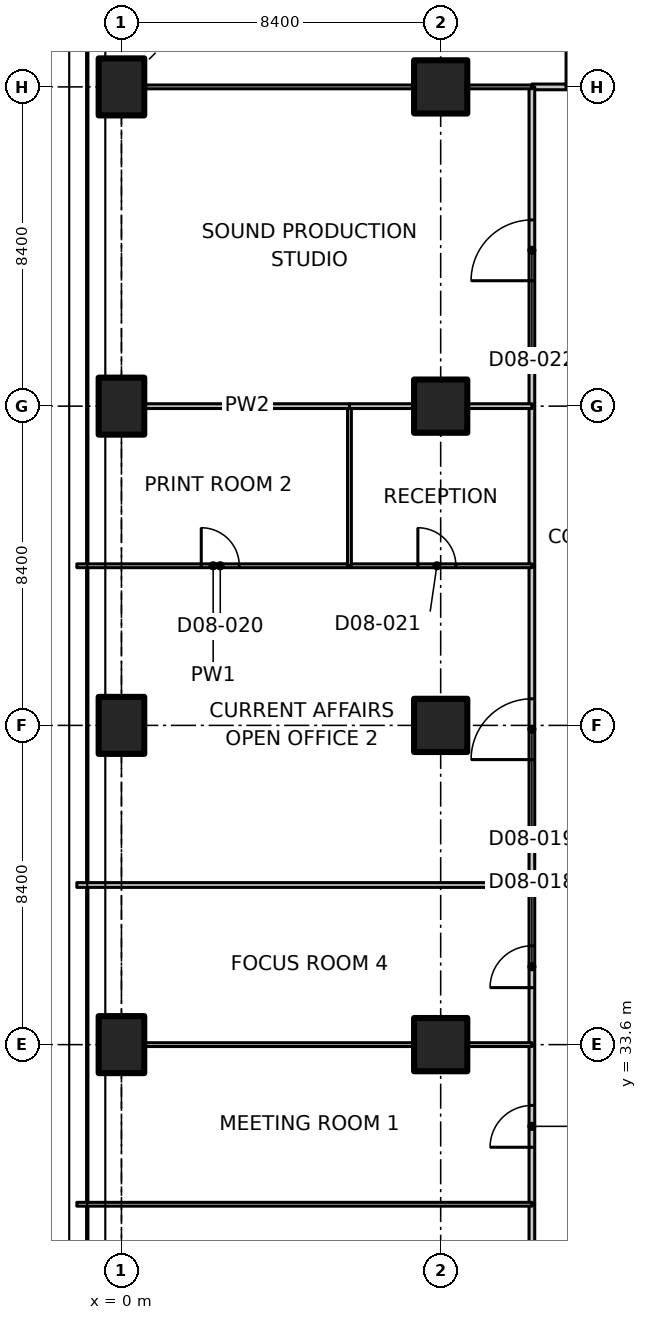
"""IFC4 building model, lengths in metres.
Left out: names, types, materials, properties, quantities, classifications, styles, units other than length and angle.
Written with IfcOpenShell. Run it as: python <this file> out.ifc"""

import sys

from ifc_helpers import new_model, si_unit, direction, frame, frame_2d, origin, origin_2d, place, context, subcontext, project, spatial, polyline, rectangle, outline, extrude, element, fill, save


model = new_model("IFC4")
c1 = context("Model", 3, precision=1e-05, world=origin(), true_north=direction((0.0, 1.0)))
c2 = subcontext(c1, "Body", "Model", "MODEL_VIEW")
j1 = project(units=[si_unit("LENGTHUNIT", "METRE"), si_unit("PLANEANGLEUNIT", "RADIAN")], contexts=[c1])
p1 = place(None, origin())
s1 = spatial("IfcSite", under=j1, at=p1, CompositionType="ELEMENT")
p2 = place(p1, origin())
s2 = spatial("IfcBuilding", under=s1, at=p2, CompositionType="ELEMENT")
p3 = place(p2, frame((0.0, 0.0, 50.9)))
s3 = spatial("IfcBuildingStorey", under=s2, at=p3, CompositionType="ELEMENT", Elevation=50.9)
for number, where, z_axis, x_axis in (
    (1, (0.0, 33.6, 0.0), (0.0, 0.0, 1.0), (1.0, 0.0, 0.0)),
    (2, (0.0, 42.0, 0.0), (0.0, 0.0, 1.0), (1.0, 0.0, 0.0)),
    (3, (0.0, 50.4, 0.0), (0.0, 0.0, 1.0), (1.0, 0.0, 0.0)),
    (4, (0.0, 58.8, 0.0), (0.0, 0.0, 1.0), (1.0, 0.0, 0.0)),
):
    element("IfcColumn", number, at=place(p3, frame(where, z_axis=z_axis, x_axis=x_axis)), inside=s3, PredefinedType="COLUMN", context=c2, shape_type="SweptSolid", body=[
        extrude(rectangle(XDim=1.2, YDim=1.5, at=origin_2d()), origin(), (0.0, 0.0, 1.0), 3.35),
    ])
for number, where, z_axis, x_axis in (
    (5, (8.4, 33.6, 0.0), (0.0, 0.0, 1.0), (1.0, 0.0, 0.0)),
    (6, (8.4, 42.0, 0.0), (0.0, 0.0, 1.0), (1.0, 0.0, 0.0)),
    (7, (8.4, 50.4, 0.0), (0.0, 0.0, 1.0), (1.0, 0.0, 0.0)),
    (8, (8.4, 58.8, 0.0), (0.0, 0.0, 1.0), (1.0, 0.0, 0.0)),
):
    element("IfcColumn", number, at=place(p3, frame(where, z_axis=z_axis, x_axis=x_axis)), inside=s3, PredefinedType="COLUMN", context=c2, shape_type="SweptSolid", body=[
        extrude(rectangle(XDim=1.4, YDim=1.4, at=origin_2d()), origin(), (0.0, 0.0, 1.0), 3.35),
    ])
p4 = place(p3, frame((10.8, 25.2, 0.0), z_axis=(0.0, 0.0, 1.0), x_axis=(0.0, 1.0, 0.0)))
e9 = element("IfcWall", 9, at=p4, inside=s3, PredefinedType="PARTITIONING", context=c2, shape_type="SweptSolid", body=[
    extrude(rectangle(XDim=4.2, YDim=0.15, at=frame_2d((2.1, 0.0))), origin(), (0.0, 0.0, 1.0), 3.33),
])
p5 = place(p4, frame((1.5, 0.0, 0.0)))
e10 = element("IfcOpeningElement", 10, at=p5, cuts=e9, PredefinedType="OPENING", context=c2, shape_type="SweptSolid", body=[
    extrude(rectangle(XDim=1.1, YDim=2.1, at=frame_2d((0.55, 1.05))), frame((0.0, 0.085, 0.0), z_axis=(0.0, -1.0, 0.0), x_axis=(1.0, 0.0, 0.0)), (0.0, 0.0, 1.0), 0.17),
])
p6 = place(p3, frame((10.8, 29.4, 0.0), z_axis=(0.0, 0.0, 1.0), x_axis=(0.0, 1.0, 0.0)))
e11 = element("IfcWall", 11, at=p6, inside=s3, PredefinedType="PARTITIONING", context=c2, shape_type="SweptSolid", body=[
    extrude(rectangle(XDim=4.2, YDim=0.15, at=frame_2d((2.1, 0.0))), origin(), (0.0, 0.0, 1.0), 3.33),
])
p7 = place(p6, frame((1.5, 0.0, 0.0)))
e12 = element("IfcOpeningElement", 12, at=p7, cuts=e11, PredefinedType="OPENING", context=c2, shape_type="SweptSolid", body=[
    extrude(rectangle(XDim=1.1, YDim=2.1, at=frame_2d((0.55, 1.05))), frame((0.0, 0.085, 0.0), z_axis=(0.0, -1.0, 0.0), x_axis=(1.0, 0.0, 0.0)), (0.0, 0.0, 1.0), 0.17),
])
p8 = place(p3, frame((10.8, 58.8, 0.0), z_axis=(0.0, 0.0, 1.0), x_axis=(1.0, 0.0, 0.0)))
e13 = element("IfcWall", 13, at=p8, inside=s3, PredefinedType="PARTITIONING", context=c2, shape_type="SweptSolid", body=[
    extrude(rectangle(XDim=3.6, YDim=0.15, at=frame_2d((1.8, 0.0))), origin(), (0.0, 0.0, 1.0), 3.33),
])
p9 = place(p8, frame((0.9, 0.0, 0.0)))
e14 = element("IfcOpeningElement", 14, at=p9, cuts=e13, PredefinedType="OPENING", context=c2, shape_type="SweptSolid", body=[
    extrude(rectangle(XDim=2.0, YDim=2.4, at=frame_2d((1.0, 1.2))), frame((0.0, 0.085, 0.0), z_axis=(0.0, -1.0, 0.0), x_axis=(1.0, 0.0, 0.0)), (0.0, 0.0, 1.0), 0.17),
])
p10 = place(p3, frame((10.8, 33.6, 0.0), z_axis=(0.0, 0.0, 1.0), x_axis=(0.0, 1.0, 0.0)))
e15 = element("IfcWall", 15, at=p10, inside=s3, PredefinedType="PARTITIONING", context=c2, shape_type="SweptSolid", body=[
    extrude(rectangle(XDim=4.2, YDim=0.15, at=frame_2d((2.1, 0.0))), origin(), (0.0, 0.0, 1.0), 3.33),
])
p11 = place(p10, frame((1.5, 0.0, 0.0)))
e16 = element("IfcOpeningElement", 16, at=p11, cuts=e15, PredefinedType="OPENING", context=c2, shape_type="SweptSolid", body=[
    extrude(rectangle(XDim=1.1, YDim=2.1, at=frame_2d((0.55, 1.05))), frame((0.0, 0.085, 0.0), z_axis=(0.0, -1.0, 0.0), x_axis=(1.0, 0.0, 0.0)), (0.0, 0.0, 1.0), 0.17),
])
p12 = place(p3, frame((10.8, 37.8, 0.0), z_axis=(0.0, 0.0, 1.0), x_axis=(0.0, 1.0, 0.0)))
e17 = element("IfcWall", 17, at=p12, inside=s3, PredefinedType="PARTITIONING", context=c2, shape_type="SweptSolid", body=[
    extrude(rectangle(XDim=8.4, YDim=0.15, at=frame_2d((4.2, 0.0))), origin(), (0.0, 0.0, 1.0), 3.33),
])
p13 = place(p12, frame((3.3, 0.0, 0.0)))
e18 = element("IfcOpeningElement", 18, at=p13, cuts=e17, PredefinedType="OPENING", context=c2, shape_type="SweptSolid", body=[
    extrude(rectangle(XDim=1.6, YDim=2.1, at=frame_2d((0.8, 1.05))), frame((0.0, 0.085, 0.0), z_axis=(0.0, -1.0, 0.0), x_axis=(1.0, 0.0, 0.0)), (0.0, 0.0, 1.0), 0.17),
])
p14 = place(p3, frame((10.8, 46.2, 0.0), z_axis=(0.0, 0.0, 1.0), x_axis=(0.0, 1.0, 0.0)))
e19 = element("IfcWall", 19, at=p14, inside=s3, PredefinedType="PARTITIONING", context=c2, shape_type="SweptSolid", body=[
    extrude(rectangle(XDim=4.2, YDim=0.15, at=frame_2d((2.1, 0.0))), origin(), (0.0, 0.0, 1.0), 3.33),
])
p15 = place(p3, frame((10.8, 50.4, 0.0), z_axis=(0.0, 0.0, 1.0), x_axis=(0.0, 1.0, 0.0)))
e20 = element("IfcWall", 20, at=p15, inside=s3, PredefinedType="PARTITIONING", context=c2, shape_type="SweptSolid", body=[
    extrude(rectangle(XDim=8.4, YDim=0.15, at=frame_2d((4.2, 0.0))), origin(), (0.0, 0.0, 1.0), 3.33),
])
p16 = place(p15, frame((3.3, 0.0, 0.0)))
e21 = element("IfcOpeningElement", 21, at=p16, cuts=e20, PredefinedType="OPENING", context=c2, shape_type="SweptSolid", body=[
    extrude(rectangle(XDim=1.6, YDim=2.1, at=frame_2d((0.8, 1.05))), frame((0.0, 0.085, 0.0), z_axis=(0.0, -1.0, 0.0), x_axis=(1.0, 0.0, 0.0)), (0.0, 0.0, 1.0), 0.17),
])
p17 = place(p3, frame((10.8, 58.8, 0.0), z_axis=(0.0, 0.0, 1.0), x_axis=(-1.0, 0.0, 0.0)))
e22 = element("IfcWall", 22, at=p17, inside=s3, PredefinedType="PARTITIONING", context=c2, shape_type="SweptSolid", body=[
    extrude(rectangle(XDim=1.68, YDim=0.1, at=frame_2d((0.84, 0.0))), origin(), (0.0, 0.0, 1.0), 3.33),
])
p18 = place(p3, frame((7.68, 58.8, 0.0), z_axis=(0.0, 0.0, 1.0), x_axis=(-1.0, 0.0, 0.0)))
e23 = element("IfcWall", 23, at=p18, inside=s3, PredefinedType="PARTITIONING", context=c2, shape_type="SweptSolid", body=[
    extrude(rectangle(XDim=7.06, YDim=0.1, at=frame_2d((3.53, 0.0))), origin(), (0.0, 0.0, 1.0), 3.33),
])
p19 = place(p3, frame((-1.174, 29.4, 0.0), z_axis=(0.0, 0.0, 1.0), x_axis=(1.0, 0.0, 0.0)))
e24 = element("IfcWall", 24, at=p19, inside=s3, PredefinedType="PARTITIONING", context=c2, shape_type="SweptSolid", body=[
    extrude(outline(polyline([(0.0, 0.0), (11.974, 0.0), (11.974, 3.33), (1.624, 3.33), (1.622, 2.98), (0.726, 2.98), (0.724, 3.33), (0.074, 3.33), (0.0, 3.33), (0.0, 0.0)])), frame((0.0, 0.05, 0.0), z_axis=(0.0, -1.0, 0.0), x_axis=(1.0, 0.0, 0.0)), (0.0, 0.0, 1.0), 0.1),
])
p20 = place(p3, frame((0.62, 33.6, 0.0), z_axis=(0.0, 0.0, 1.0), x_axis=(1.0, 0.0, 0.0)))
e25 = element("IfcWall", 25, at=p20, inside=s3, PredefinedType="PARTITIONING", context=c2, shape_type="SweptSolid", body=[
    extrude(rectangle(XDim=7.06, YDim=0.1, at=frame_2d((3.53, 0.0))), origin(), (0.0, 0.0, 1.0), 3.33),
])
p21 = place(p3, frame((9.12, 33.6, 0.0), z_axis=(0.0, 0.0, 1.0), x_axis=(1.0, 0.0, 0.0)))
e26 = element("IfcWall", 26, at=p21, inside=s3, PredefinedType="PARTITIONING", context=c2, shape_type="SweptSolid", body=[
    extrude(rectangle(XDim=1.68, YDim=0.1, at=frame_2d((0.84, 0.0))), origin(), (0.0, 0.0, 1.0), 3.33),
])
p22 = place(p3, frame((-1.174, 37.8, 0.0), z_axis=(0.0, 0.0, 1.0), x_axis=(1.0, 0.0, 0.0)))
e27 = element("IfcWall", 27, at=p22, inside=s3, PredefinedType="PARTITIONING", context=c2, shape_type="SweptSolid", body=[
    extrude(outline(polyline([(0.0, 0.0), (11.974, 0.0), (11.974, 3.33), (1.624, 3.33), (1.622, 2.98), (0.726, 2.98), (0.724, 3.33), (0.074, 3.33), (0.0, 3.33), (0.0, 0.0)])), frame((0.0, 0.062, 0.0), z_axis=(0.0, -1.0, 0.0), x_axis=(1.0, 0.0, 0.0)), (0.0, 0.0, 1.0), 0.125),
])
p23 = place(p3, frame((-1.174, 46.2, 0.0), z_axis=(0.0, 0.0, 1.0), x_axis=(1.0, 0.0, 0.0)))
e28 = element("IfcWall", 28, at=p23, inside=s3, PredefinedType="PARTITIONING", context=c2, shape_type="SweptSolid", body=[
    extrude(outline(polyline([(0.0, 0.0), (7.174, 0.0), (7.174, 3.33), (1.624, 3.33), (1.622, 2.98), (0.726, 2.98), (0.724, 3.33), (0.074, 3.33), (0.0, 3.33), (0.0, 0.0)])), frame((0.0, 0.05, 0.0), z_axis=(0.0, -1.0, 0.0), x_axis=(1.0, 0.0, 0.0)), (0.0, 0.0, 1.0), 0.1),
])
p24 = place(p23, frame((3.274, 0.0, 0.0)))
e29 = element("IfcOpeningElement", 29, at=p24, cuts=e28, PredefinedType="OPENING", context=c2, shape_type="SweptSolid", body=[
    extrude(rectangle(XDim=1.0, YDim=2.1, at=frame_2d((0.5, 1.05))), frame((0.0, 0.06, 0.0), z_axis=(0.0, -1.0, 0.0), x_axis=(1.0, 0.0, 0.0)), (0.0, 0.0, 1.0), 0.12),
])
p25 = place(p3, frame((6.0, 46.2, 0.0), z_axis=(0.0, 0.0, 1.0), x_axis=(1.0, 0.0, 0.0)))
e30 = element("IfcWall", 30, at=p25, inside=s3, PredefinedType="PARTITIONING", context=c2, shape_type="SweptSolid", body=[
    extrude(rectangle(XDim=4.8, YDim=0.1, at=frame_2d((2.4, 0.0))), origin(), (0.0, 0.0, 1.0), 3.33),
])
p26 = place(p25, frame((1.8, 0.0, 0.0)))
e31 = element("IfcOpeningElement", 31, at=p26, cuts=e30, PredefinedType="OPENING", context=c2, shape_type="SweptSolid", body=[
    extrude(rectangle(XDim=1.0, YDim=2.1, at=frame_2d((0.5, 1.05))), frame((0.0, 0.06, 0.0), z_axis=(0.0, -1.0, 0.0), x_axis=(1.0, 0.0, 0.0)), (0.0, 0.0, 1.0), 0.12),
])
p27 = place(p3, frame((6.0, 50.4, 0.0), z_axis=(0.0, 0.0, 1.0), x_axis=(0.0, -1.0, 0.0)))
e32 = element("IfcWall", 32, at=p27, inside=s3, PredefinedType="PARTITIONING", context=c2, shape_type="SweptSolid", body=[
    extrude(rectangle(XDim=4.2, YDim=0.1, at=frame_2d((2.1, 0.0))), origin(), (0.0, 0.0, 1.0), 3.33),
])
p28 = place(p3, frame((0.62, 50.4, 0.0), z_axis=(0.0, 0.0, 1.0), x_axis=(1.0, 0.0, 0.0)))
e33 = element("IfcWall", 33, at=p28, inside=s3, PredefinedType="PARTITIONING", context=c2, shape_type="SweptSolid", body=[
    extrude(rectangle(XDim=5.38, YDim=0.125, at=frame_2d((2.69, 0.0))), origin(), (0.0, 0.0, 1.0), 3.33),
])
for number, where, z_axis, x_axis in (
    (34, (6.0, 50.4, 0.0), (0.0, 0.0, 1.0), (1.0, 0.0, 0.0)),
    (35, (9.12, 50.4, 0.0), (0.0, 0.0, 1.0), (1.0, 0.0, 0.0)),
):
    element("IfcWall", number, at=place(p3, frame(where, z_axis=z_axis, x_axis=x_axis)), inside=s3, PredefinedType="PARTITIONING", context=c2, shape_type="SweptSolid", body=[
        extrude(rectangle(XDim=1.68, YDim=0.125, at=frame_2d((0.84, 0.0))), origin(), (0.0, 0.0, 1.0), 3.33),
    ])
p29 = place(p9, origin())
e36 = element("IfcDoor", 36, at=p29, inside=s3, OperationType="DOUBLE_DOOR_SINGLE_SWING", PredefinedType="DOOR", context=c2, shape_type="SweptSolid", body=[
    extrude(rectangle(XDim=2.0, YDim=2.4, at=frame_2d((1.0, 1.2))), frame((0.0, 0.025, 0.0), z_axis=(0.0, -1.0, 0.0), x_axis=(1.0, 0.0, 0.0)), (0.0, 0.0, 1.0), 0.05),
])
fill(e14, e36)
p30 = place(p7, origin())
e37 = element("IfcDoor", 37, at=p30, inside=s3, OperationType="SINGLE_SWING_LEFT", PredefinedType="DOOR", context=c2, shape_type="SweptSolid", body=[
    extrude(rectangle(XDim=1.1, YDim=2.1, at=frame_2d((0.55, 1.05))), frame((0.0, 0.025, 0.0), z_axis=(0.0, -1.0, 0.0), x_axis=(1.0, 0.0, 0.0)), (0.0, 0.0, 1.0), 0.05),
])
fill(e12, e37)
p31 = place(p11, origin())
e38 = element("IfcDoor", 38, at=p31, inside=s3, OperationType="SINGLE_SWING_LEFT", PredefinedType="DOOR", context=c2, shape_type="SweptSolid", body=[
    extrude(rectangle(XDim=1.1, YDim=2.1, at=frame_2d((0.55, 1.05))), frame((0.0, 0.025, 0.0), z_axis=(0.0, -1.0, 0.0), x_axis=(1.0, 0.0, 0.0)), (0.0, 0.0, 1.0), 0.05),
])
fill(e16, e38)
p32 = place(p13, origin())
e39 = element("IfcDoor", 39, at=p32, inside=s3, OperationType="DOUBLE_DOOR_SINGLE_SWING", PredefinedType="DOOR", context=c2, shape_type="SweptSolid", body=[
    extrude(rectangle(XDim=1.6, YDim=2.1, at=frame_2d((0.8, 1.05))), frame((0.0, 0.025, 0.0), z_axis=(0.0, -1.0, 0.0), x_axis=(1.0, 0.0, 0.0)), (0.0, 0.0, 1.0), 0.05),
])
fill(e18, e39)
p33 = place(p24, origin())
e40 = element("IfcDoor", 40, at=p33, inside=s3, OperationType="SINGLE_SWING_LEFT", PredefinedType="DOOR", context=c2, shape_type="SweptSolid", body=[
    extrude(rectangle(XDim=1.0, YDim=2.1, at=frame_2d((0.5, 1.05))), frame((0.0, 0.025, 0.0), z_axis=(0.0, -1.0, 0.0), x_axis=(1.0, 0.0, 0.0)), (0.0, 0.0, 1.0), 0.05),
])
fill(e29, e40)
p34 = place(p26, origin())
e41 = element("IfcDoor", 41, at=p34, inside=s3, OperationType="SINGLE_SWING_LEFT", PredefinedType="DOOR", context=c2, shape_type="SweptSolid", body=[
    extrude(rectangle(XDim=1.0, YDim=2.1, at=frame_2d((0.5, 1.05))), frame((0.0, 0.025, 0.0), z_axis=(0.0, -1.0, 0.0), x_axis=(1.0, 0.0, 0.0)), (0.0, 0.0, 1.0), 0.05),
])
fill(e31, e41)
p35 = place(p16, origin())
e42 = element("IfcDoor", 42, at=p35, inside=s3, OperationType="DOUBLE_DOOR_SINGLE_SWING", PredefinedType="DOOR", context=c2, shape_type="SweptSolid", body=[
    extrude(rectangle(XDim=1.6, YDim=2.1, at=frame_2d((0.8, 1.05))), frame((0.0, 0.025, 0.0), z_axis=(0.0, -1.0, 0.0), x_axis=(1.0, 0.0, 0.0)), (0.0, 0.0, 1.0), 0.05),
])
fill(e21, e42)
save(model, sys.argv[1])
